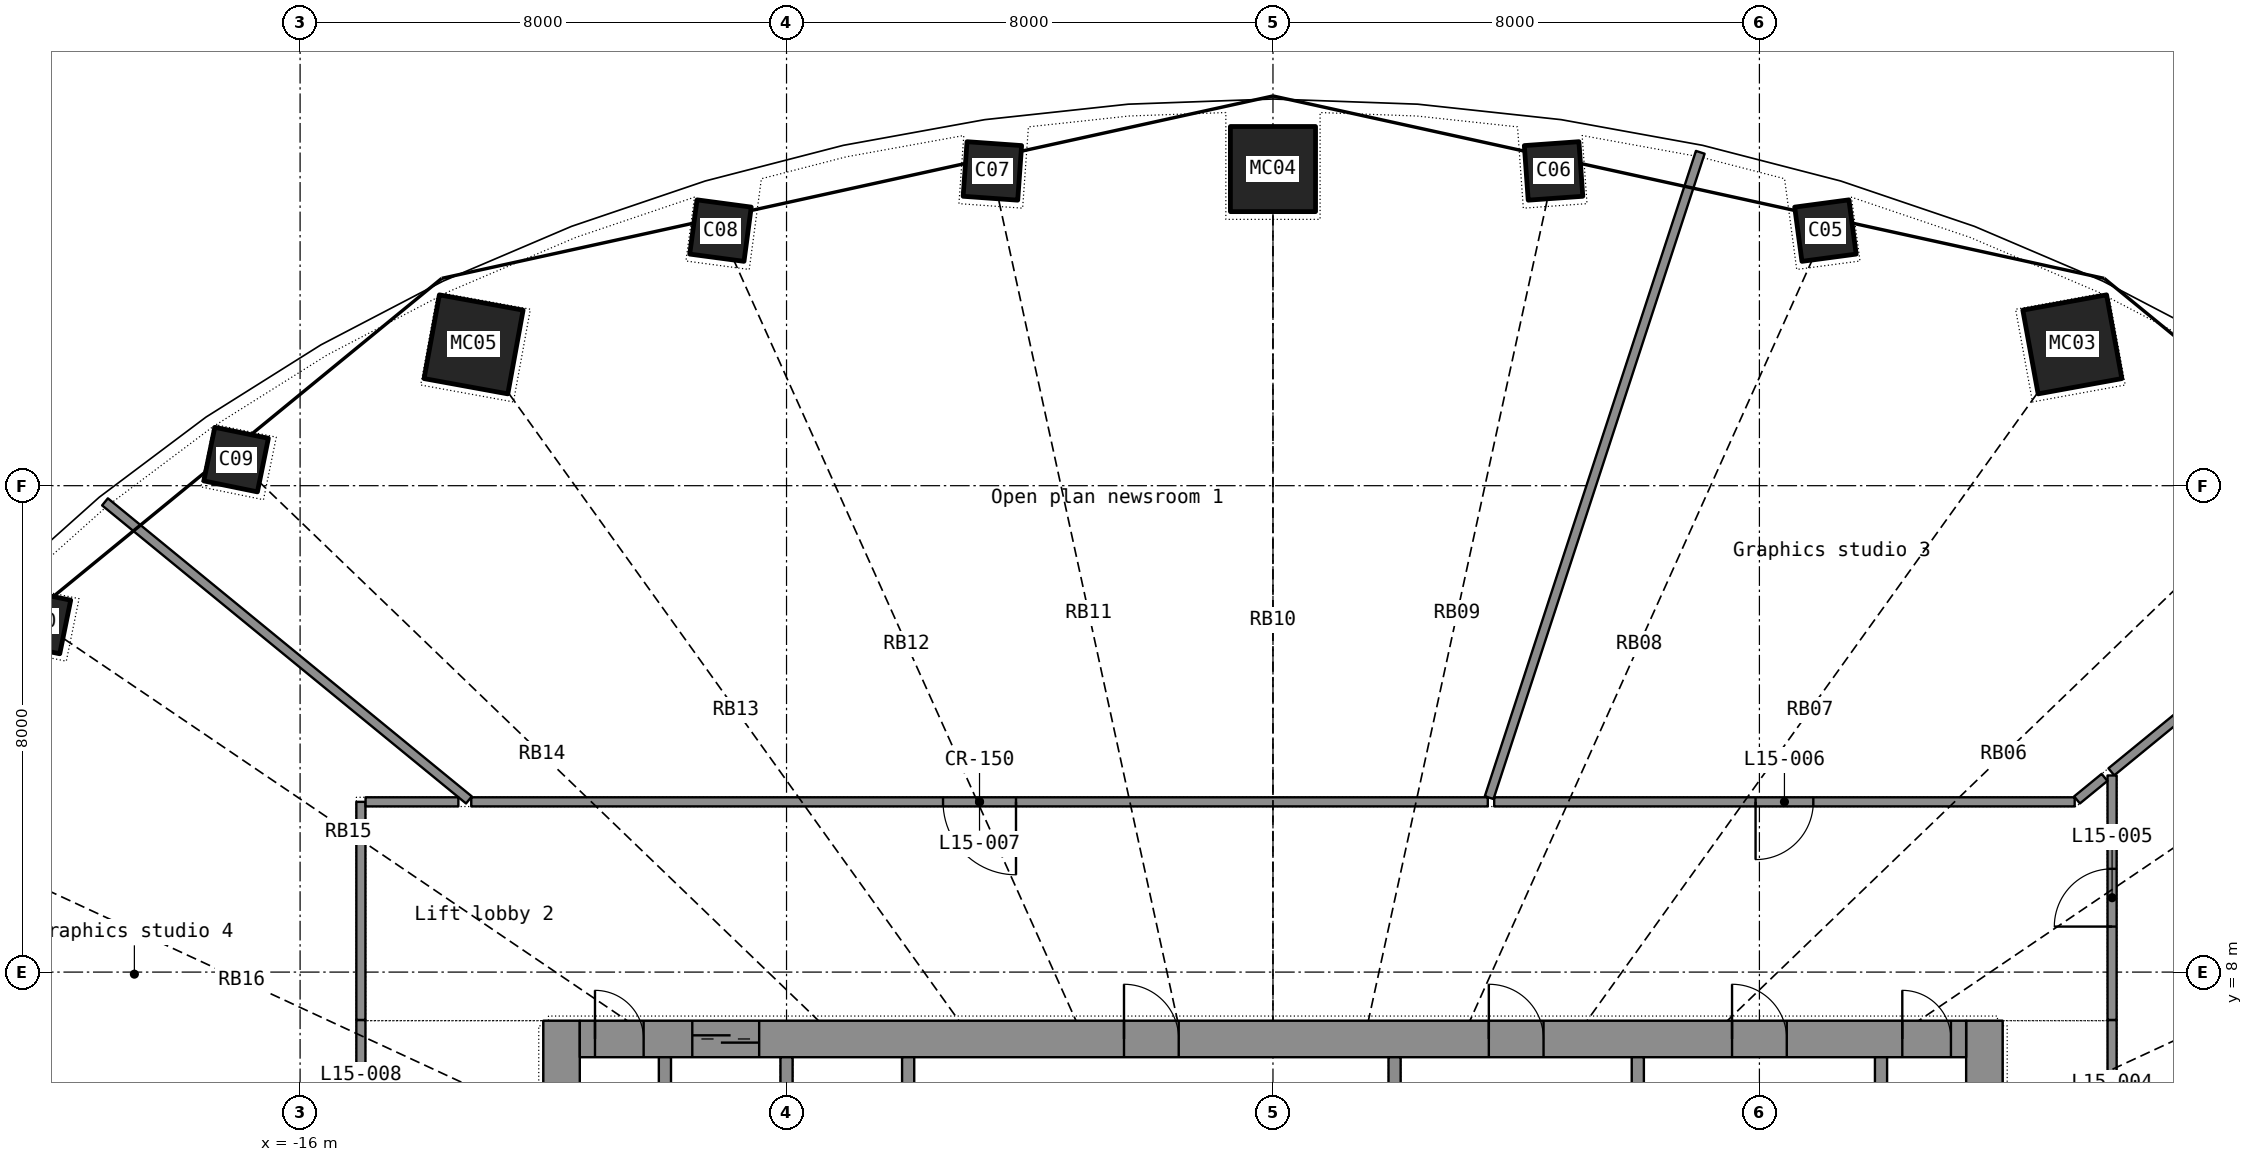
"""IFC4 building model, lengths in metres.
Left out: names, types, materials, properties, quantities, classifications, styles, units other than length and angle.
Written with IfcOpenShell. Run it as: python <this file> out.ifc"""

import sys

from ifc_helpers import new_model, si_unit, direction, frame, frame_2d, origin, origin_2d, place, context, subcontext, project, spatial, rectangle, hollow_rectangle, extrude, element, fill, save


model = new_model("IFC4")
c1 = context("Model", 3, precision=1e-05, world=origin(), true_north=direction((0.0, 1.0)))
c2 = subcontext(c1, "Body", "Model", "MODEL_VIEW")
j1 = project(units=[si_unit("LENGTHUNIT", "METRE"), si_unit("PLANEANGLEUNIT", "RADIAN")], contexts=[c1])
p1 = place(None, origin())
s1 = spatial("IfcSite", under=j1, at=p1, CompositionType="ELEMENT")
p2 = place(p1, origin())
s2 = spatial("IfcBuilding", under=s1, at=p2, CompositionType="ELEMENT")
p3 = place(p2, frame((0.0, 0.0, 66.7)))
s3 = spatial("IfcBuildingStorey", under=s2, at=p3, CompositionType="ELEMENT", Elevation=66.7)
p4 = place(p3, frame((13.146, 18.324, 0.0), z_axis=(-0.017280237, -0.024535299, 0.999549605), x_axis=(0.907657106, -0.419677884, 0.005390036)))
e1 = element("IfcColumn", 1, at=p4, inside=s3, PredefinedType="COLUMN", context=c2, shape_type="SweptSolid", body=[
    extrude(hollow_rectangle(XDim=1.4, YDim=1.4, WallThickness=0.04, at=origin_2d()), origin(), (0.0, 0.0, 1.0), 3.702),
])
for number, where, z_axis, x_axis in (
    (2, (9.086, 20.196, 0.0), (-0.012, -0.027, 1.0), (0.959, -0.282, 0.004)),
    (3, (4.615, 21.177, 0.0), (-0.006, -0.028, 1.0), (0.99, -0.14, 0.002)),
):
    element("IfcColumn", number, at=place(p3, frame(where, z_axis=z_axis, x_axis=x_axis)), inside=s3, PredefinedType="COLUMN", context=c2, shape_type="SweptSolid", body=[
        extrude(hollow_rectangle(XDim=0.9, YDim=0.9, WallThickness=0.025, at=origin_2d()), origin(), (0.0, 0.0, 1.0), 3.701),
    ])
p5 = place(p3, frame((0.0, 21.208, 0.0), z_axis=(0.0, -0.02836206, 0.999597716), x_axis=(1.0, 0.0, 0.0)))
e4 = element("IfcColumn", 4, at=p5, inside=s3, PredefinedType="COLUMN", context=c2, shape_type="SweptSolid", body=[
    extrude(hollow_rectangle(XDim=1.4, YDim=1.4, WallThickness=0.04, at=origin_2d()), origin(), (0.0, 0.0, 1.0), 3.701),
])
for number, where, z_axis, x_axis in (
    (5, (-4.615, 21.177, 0.0), (0.006, -0.028, 1.0), (0.99, 0.14, -0.002)),
    (6, (-9.086, 20.196, 0.0), (0.012, -0.027, 1.0), (0.959, 0.282, -0.004)),
):
    element("IfcColumn", number, at=place(p3, frame(where, z_axis=z_axis, x_axis=x_axis)), inside=s3, PredefinedType="COLUMN", context=c2, shape_type="SweptSolid", body=[
        extrude(hollow_rectangle(XDim=0.9, YDim=0.9, WallThickness=0.025, at=origin_2d()), origin(), (0.0, 0.0, 1.0), 3.701),
    ])
p6 = place(p3, frame((-13.146, 18.324, 0.0), z_axis=(0.017280237, -0.024535299, 0.999549605), x_axis=(0.907657106, 0.419677884, -0.005390036)))
e7 = element("IfcColumn", 7, at=p6, inside=s3, PredefinedType="COLUMN", context=c2, shape_type="SweptSolid", body=[
    extrude(hollow_rectangle(XDim=1.4, YDim=1.4, WallThickness=0.04, at=origin_2d()), origin(), (0.0, 0.0, 1.0), 3.702),
])
p7 = place(p3, frame((-17.052, 16.429, 0.0), z_axis=(0.022226156, -0.021698532, 0.999517469), x_axis=(0.82776399, 0.561041886, -0.006227231)))
e8 = element("IfcColumn", 8, at=p7, inside=s3, PredefinedType="COLUMN", context=c2, shape_type="SweptSolid", body=[
    extrude(hollow_rectangle(XDim=0.9, YDim=0.9, WallThickness=0.025, at=origin_2d()), origin(), (0.0, 0.0, 1.0), 3.702),
])
p8 = place(p3, frame((-20.303, 13.767, 0.0), z_axis=(0.026512179, -0.018202391, 0.999482755), x_axis=(0.719547914, 0.694412935, -0.006440138)))
e9 = element("IfcColumn", 9, at=p8, inside=s3, PredefinedType="COLUMN", context=c2, shape_type="SweptSolid", body=[
    extrude(hollow_rectangle(XDim=0.9, YDim=0.9, WallThickness=0.025, at=origin_2d()), origin(), (0.0, 0.0, 1.0), 3.702),
])
p9 = place(p3, frame((-11.7, -7.2, 0.0), z_axis=(0.0, 0.0, 1.0), x_axis=(0.0, 1.0, 0.0)))
e10 = element("IfcWall", 10, at=p9, inside=s3, PredefinedType="SHEAR", context=c2, shape_type="SweptSolid", body=[
    extrude(rectangle(XDim=14.4, YDim=0.6, at=frame_2d((7.2, 0.0))), origin(), (0.0, 0.0, 1.0), 3.3),
])
p10 = place(p9, frame((6.5, 0.0, 0.0)))
e11 = element("IfcOpeningElement", 11, at=p10, cuts=e10, PredefinedType="OPENING", context=c2, shape_type="SweptSolid", body=[
    extrude(rectangle(XDim=1.4, YDim=2.2, at=frame_2d((0.7, 1.1))), frame((0.0, 0.31, 0.0), z_axis=(0.0, -1.0, 0.0), x_axis=(1.0, 0.0, 0.0)), (0.0, 0.0, 1.0), 0.62),
])
p11 = place(p3, frame((11.7, -7.2, 0.0), z_axis=(0.0, 0.0, 1.0), x_axis=(0.0, 1.0, 0.0)))
e12 = element("IfcWall", 12, at=p11, inside=s3, PredefinedType="SHEAR", context=c2, shape_type="SweptSolid", body=[
    extrude(rectangle(XDim=14.4, YDim=0.6, at=frame_2d((7.2, 0.0))), origin(), (0.0, 0.0, 1.0), 3.3),
])
p12 = place(p11, frame((6.5, 0.0, 0.0)))
e13 = element("IfcOpeningElement", 13, at=p12, cuts=e12, PredefinedType="OPENING", context=c2, shape_type="SweptSolid", body=[
    extrude(rectangle(XDim=1.4, YDim=2.2, at=frame_2d((0.7, 1.1))), frame((0.0, 0.31, 0.0), z_axis=(0.0, -1.0, 0.0), x_axis=(1.0, 0.0, 0.0)), (0.0, 0.0, 1.0), 0.62),
])
p13 = place(p3, frame((-11.4, 6.9, 0.0), z_axis=(0.0, 0.0, 1.0), x_axis=(1.0, 0.0, 0.0)))
e14 = element("IfcWall", 14, at=p13, inside=s3, PredefinedType="SHEAR", context=c2, shape_type="SweptSolid", body=[
    extrude(rectangle(XDim=22.8, YDim=0.6, at=frame_2d((11.4, 0.0))), origin(), (0.0, 0.0, 1.0), 3.3),
])
p14 = place(p13, frame((1.85, 0.0, 0.0)))
e15 = element("IfcOpeningElement", 15, at=p14, cuts=e14, PredefinedType="OPENING", context=c2, shape_type="SweptSolid", body=[
    extrude(rectangle(XDim=1.1, YDim=2.2, at=frame_2d((0.55, 1.1))), frame((0.0, 0.31, 0.0), z_axis=(0.0, -1.0, 0.0), x_axis=(1.0, 0.0, 0.0)), (0.0, 0.0, 1.0), 0.62),
])
p15 = place(p13, frame((8.95, 0.0, 0.0)))
e16 = element("IfcOpeningElement", 16, at=p15, cuts=e14, PredefinedType="OPENING", context=c2, shape_type="SweptSolid", body=[
    extrude(rectangle(XDim=0.9, YDim=2.1, at=frame_2d((0.45, 1.05))), frame((0.0, 0.31, 0.0), z_axis=(0.0, -1.0, 0.0), x_axis=(1.0, 0.0, 0.0)), (0.0, 0.0, 1.0), 0.62),
])
p16 = place(p13, frame((14.95, 0.0, 0.0)))
e17 = element("IfcOpeningElement", 17, at=p16, cuts=e14, PredefinedType="OPENING", context=c2, shape_type="SweptSolid", body=[
    extrude(rectangle(XDim=0.9, YDim=2.1, at=frame_2d((0.45, 1.05))), frame((0.0, 0.31, 0.0), z_axis=(0.0, -1.0, 0.0), x_axis=(1.0, 0.0, 0.0)), (0.0, 0.0, 1.0), 0.62),
])
p17 = place(p13, frame((18.95, 0.0, 0.0)))
e18 = element("IfcOpeningElement", 18, at=p17, cuts=e14, PredefinedType="OPENING", context=c2, shape_type="SweptSolid", body=[
    extrude(rectangle(XDim=0.9, YDim=2.1, at=frame_2d((0.45, 1.05))), frame((0.0, 0.31, 0.0), z_axis=(0.0, -1.0, 0.0), x_axis=(1.0, 0.0, 0.0)), (0.0, 0.0, 1.0), 0.62),
])
p18 = place(p13, frame((0.25, 0.0, 0.0)))
e19 = element("IfcOpeningElement", 19, at=p18, cuts=e14, PredefinedType="OPENING", context=c2, shape_type="SweptSolid", body=[
    extrude(rectangle(XDim=0.8, YDim=2.05, at=frame_2d((0.4, 1.025))), frame((0.0, 0.31, 0.0), z_axis=(0.0, -1.0, 0.0), x_axis=(1.0, 0.0, 0.0)), (0.0, 0.0, 1.0), 0.62),
])
p19 = place(p13, frame((21.75, 0.0, 0.0)))
e20 = element("IfcOpeningElement", 20, at=p19, cuts=e14, PredefinedType="OPENING", context=c2, shape_type="SweptSolid", body=[
    extrude(rectangle(XDim=0.8, YDim=2.05, at=frame_2d((0.4, 1.025))), frame((0.0, 0.31, 0.0), z_axis=(0.0, -1.0, 0.0), x_axis=(1.0, 0.0, 0.0)), (0.0, 0.0, 1.0), 0.62),
])
for number, where, z_axis, x_axis in (
    (21, (-10.0, 3.9, 0.0), (0.0, 0.0, 1.0), (0.0, 1.0, 0.0)),
    (22, (-8.0, 3.9, 0.0), (0.0, 0.0, 1.0), (0.0, 1.0, 0.0)),
    (23, (-6.0, 3.9, 0.0), (0.0, 0.0, 1.0), (0.0, 1.0, 0.0)),
    (24, (10.0, 3.9, 0.0), (0.0, 0.0, 1.0), (0.0, 1.0, 0.0)),
):
    element("IfcWall", number, at=place(p3, frame(where, z_axis=z_axis, x_axis=x_axis)), inside=s3, PredefinedType="SHEAR", context=c2, shape_type="SweptSolid", body=[
        extrude(rectangle(XDim=2.7, YDim=0.2, at=frame_2d((1.35, 0.0))), origin(), (0.0, 0.0, 1.0), 3.3),
    ])
for number, where, z_axis, x_axis in (
    (25, (2.0, 3.9, 0.0), (0.0, 0.0, 1.0), (0.0, 1.0, 0.0)),
    (26, (6.0, 3.9, 0.0), (0.0, 0.0, 1.0), (0.0, 1.0, 0.0)),
):
    element("IfcWall", number, at=place(p3, frame(where, z_axis=z_axis, x_axis=x_axis)), inside=s3, PredefinedType="PARTITIONING", context=c2, shape_type="SweptSolid", body=[
        extrude(rectangle(XDim=2.7, YDim=0.2, at=frame_2d((1.35, 0.0))), origin(), (0.0, 0.0, 1.0), 3.3),
    ])
p20 = place(p3, frame((3.533, 10.8, 0.0), z_axis=(0.0, 0.0, 1.0), x_axis=(-1.0, 0.0, 0.0)))
e27 = element("IfcWall", 27, at=p20, inside=s3, PredefinedType="PARTITIONING", context=c2, shape_type="SweptSolid", body=[
    extrude(rectangle(XDim=16.718, YDim=0.15, at=frame_2d((8.359, 0.0))), origin(), (0.0, 0.0, 1.0), 2.4),
])
p21 = place(p20, frame((7.759, 0.0, 0.0)))
e28 = element("IfcOpeningElement", 28, at=p21, cuts=e27, PredefinedType="OPENING", context=c2, shape_type="SweptSolid", body=[
    extrude(rectangle(XDim=1.2, YDim=2.2, at=frame_2d((0.6, 1.1))), frame((0.0, 0.085, 0.0), z_axis=(0.0, -1.0, 0.0), x_axis=(1.0, 0.0, 0.0)), (0.0, 0.0, 1.0), 0.17),
])
p22 = place(p3, frame((7.028, 21.483, 0.0), z_axis=(0.0, 0.0, 1.0), x_axis=(-0.31091662, -0.950437192, 0.0)))
e29 = element("IfcWall", 29, at=p22, inside=s3, PredefinedType="PARTITIONING", context=c2, shape_type="SweptSolid", body=[
    extrude(rectangle(XDim=11.167, YDim=0.15, at=frame_2d((5.583, 0.0))), origin(), (0.0, 0.0, 1.0), 2.4),
])
p23 = place(p3, frame((13.185, 10.8, 0.0), z_axis=(0.0, 0.0, 1.0), x_axis=(-1.0, 0.0, 0.0)))
e30 = element("IfcWall", 30, at=p23, inside=s3, PredefinedType="PARTITIONING", context=c2, shape_type="SweptSolid", body=[
    extrude(rectangle(XDim=9.547, YDim=0.15, at=frame_2d((4.773, 0.0))), origin(), (0.0, 0.0, 1.0), 2.4),
])
p24 = place(p23, frame((4.298, 0.0, 0.0)))
e31 = element("IfcOpeningElement", 31, at=p24, cuts=e30, PredefinedType="OPENING", context=c2, shape_type="SweptSolid", body=[
    extrude(rectangle(XDim=0.95, YDim=2.15, at=frame_2d((0.475, 1.075))), frame((0.0, 0.085, 0.0), z_axis=(0.0, -1.0, 0.0), x_axis=(1.0, 0.0, 0.0)), (0.0, 0.0, 1.0), 0.17),
])
p25 = place(p3, frame((-19.208, 15.734, 0.0), z_axis=(0.0, 0.0, 1.0), x_axis=(0.773597247, -0.633677598, 0.0)))
e32 = element("IfcWall", 32, at=p25, inside=s3, PredefinedType="PARTITIONING", context=c2, shape_type="SweptSolid", body=[
    extrude(rectangle(XDim=7.737, YDim=0.15, at=frame_2d((3.868, 0.0))), origin(), (0.0, 0.0, 1.0), 2.4),
])
p26 = place(p3, frame((19.207, 15.733, 0.0), z_axis=(0.0, 0.0, 1.0), x_axis=(-0.773587592, -0.633689385, 0.0)))
e33 = element("IfcWall", 33, at=p26, inside=s3, PredefinedType="PARTITIONING", context=c2, shape_type="SweptSolid", body=[
    extrude(rectangle(XDim=7.005, YDim=0.15, at=frame_2d((3.502, 0.0))), origin(), (0.0, 0.0, 1.0), 2.4),
])
p27 = place(p3, frame((13.8, 3.124, 0.0), z_axis=(0.0, 0.0, 1.0), x_axis=(0.0, 1.0, 0.0)))
e34 = element("IfcWall", 34, at=p27, inside=s3, PredefinedType="PARTITIONING", context=c2, shape_type="SweptSolid", body=[
    extrude(rectangle(XDim=4.088, YDim=0.15, at=frame_2d((2.044, 0.0))), origin(), (0.0, 0.0, 1.0), 2.4),
])
p28 = place(p27, frame((1.569, 0.0, 0.0)))
e35 = element("IfcOpeningElement", 35, at=p28, cuts=e34, PredefinedType="OPENING", context=c2, shape_type="SweptSolid", body=[
    extrude(rectangle(XDim=0.95, YDim=2.15, at=frame_2d((0.475, 1.075))), frame((0.0, 0.085, 0.0), z_axis=(0.0, -1.0, 0.0), x_axis=(1.0, 0.0, 0.0)), (0.0, 0.0, 1.0), 0.17),
])
p29 = place(p3, frame((13.8, 7.213, 0.0), z_axis=(0.0, 0.0, 1.0), x_axis=(0.0, 1.0, 0.0)))
e36 = element("IfcWall", 36, at=p29, inside=s3, PredefinedType="PARTITIONING", context=c2, shape_type="SweptSolid", body=[
    extrude(rectangle(XDim=4.021, YDim=0.15, at=frame_2d((2.01, 0.0))), origin(), (0.0, 0.0, 1.0), 2.4),
])
p30 = place(p29, frame((1.535, 0.0, 0.0)))
e37 = element("IfcOpeningElement", 37, at=p30, cuts=e36, PredefinedType="OPENING", context=c2, shape_type="SweptSolid", body=[
    extrude(rectangle(XDim=0.95, YDim=2.15, at=frame_2d((0.475, 1.075))), frame((0.0, 0.085, 0.0), z_axis=(0.0, -1.0, 0.0), x_axis=(1.0, 0.0, 0.0)), (0.0, 0.0, 1.0), 0.17),
])
p31 = place(p3, frame((-15.0, 7.212, 0.0), z_axis=(0.0, 0.0, 1.0), x_axis=(0.0, -1.0, 0.0)))
e38 = element("IfcWall", 38, at=p31, inside=s3, PredefinedType="PARTITIONING", context=c2, shape_type="SweptSolid", body=[
    extrude(rectangle(XDim=3.824, YDim=0.15, at=frame_2d((1.912, 0.0))), origin(), (0.0, 0.0, 1.0), 2.4),
])
p32 = place(p31, frame((1.437, 0.0, 0.0)))
e39 = element("IfcOpeningElement", 39, at=p32, cuts=e38, PredefinedType="OPENING", context=c2, shape_type="SweptSolid", body=[
    extrude(rectangle(XDim=0.95, YDim=2.15, at=frame_2d((0.475, 1.075))), frame((0.0, 0.085, 0.0), z_axis=(0.0, -1.0, 0.0), x_axis=(1.0, 0.0, 0.0)), (0.0, 0.0, 1.0), 0.17),
])
p33 = place(p3, frame((-15.0, 10.8, 0.0), z_axis=(0.0, 0.0, 1.0), x_axis=(0.0, -1.0, 0.0)))
e40 = element("IfcWall", 40, at=p33, inside=s3, PredefinedType="PARTITIONING", context=c2, shape_type="SweptSolid", body=[
    extrude(rectangle(XDim=3.587, YDim=0.15, at=frame_2d((1.793, 0.0))), origin(), (0.0, 0.0, 1.0), 2.4),
])
p34 = place(p3, frame((-13.397, 10.8, 0.0), z_axis=(0.0, 0.0, 1.0), x_axis=(-1.0, 0.0, 0.0)))
e41 = element("IfcWall", 41, at=p34, inside=s3, PredefinedType="PARTITIONING", context=c2, shape_type="SweptSolid", body=[
    extrude(rectangle(XDim=1.526, YDim=0.15, at=frame_2d((0.763, 0.0))), origin(), (0.0, 0.0, 1.0), 2.4),
])
p35 = place(p3, frame((13.676, 11.202, 0.0), z_axis=(0.0, 0.0, 1.0), x_axis=(-0.773566552, -0.63371507, 0.0)))
e42 = element("IfcWall", 42, at=p35, inside=s3, PredefinedType="PARTITIONING", context=c2, shape_type="SweptSolid", body=[
    extrude(rectangle(XDim=0.585, YDim=0.15, at=frame_2d((0.292, 0.0))), origin(), (0.0, 0.0, 1.0), 2.4),
])
p36 = place(p14, origin())
e43 = element("IfcDoor", 43, at=p36, inside=s3, OperationType="DOUBLE_DOOR_SLIDING", PredefinedType="DOOR", context=c2, shape_type="SweptSolid", body=[
    extrude(rectangle(XDim=1.1, YDim=2.2, at=frame_2d((0.55, 1.1))), frame((0.0, 0.025, 0.0), z_axis=(0.0, -1.0, 0.0), x_axis=(1.0, 0.0, 0.0)), (0.0, 0.0, 1.0), 0.05),
])
fill(e15, e43)
p37 = place(p15, origin())
e44 = element("IfcDoor", 44, at=p37, inside=s3, OperationType="SINGLE_SWING_LEFT", PredefinedType="DOOR", context=c2, shape_type="SweptSolid", body=[
    extrude(rectangle(XDim=0.9, YDim=2.1, at=frame_2d((0.45, 1.05))), frame((0.0, 0.025, 0.0), z_axis=(0.0, -1.0, 0.0), x_axis=(1.0, 0.0, 0.0)), (0.0, 0.0, 1.0), 0.05),
])
fill(e16, e44)
p38 = place(p16, origin())
e45 = element("IfcDoor", 45, at=p38, inside=s3, OperationType="SINGLE_SWING_LEFT", PredefinedType="DOOR", context=c2, shape_type="SweptSolid", body=[
    extrude(rectangle(XDim=0.9, YDim=2.1, at=frame_2d((0.45, 1.05))), frame((0.0, 0.025, 0.0), z_axis=(0.0, -1.0, 0.0), x_axis=(1.0, 0.0, 0.0)), (0.0, 0.0, 1.0), 0.05),
])
fill(e17, e45)
p39 = place(p17, origin())
e46 = element("IfcDoor", 46, at=p39, inside=s3, OperationType="SINGLE_SWING_LEFT", PredefinedType="DOOR", context=c2, shape_type="SweptSolid", body=[
    extrude(rectangle(XDim=0.9, YDim=2.1, at=frame_2d((0.45, 1.05))), frame((0.0, 0.025, 0.0), z_axis=(0.0, -1.0, 0.0), x_axis=(1.0, 0.0, 0.0)), (0.0, 0.0, 1.0), 0.05),
])
fill(e18, e46)
p40 = place(p18, origin())
e47 = element("IfcDoor", 47, at=p40, inside=s3, OperationType="SINGLE_SWING_LEFT", PredefinedType="DOOR", context=c2, shape_type="SweptSolid", body=[
    extrude(rectangle(XDim=0.8, YDim=2.05, at=frame_2d((0.4, 1.025))), frame((0.0, 0.025, 0.0), z_axis=(0.0, -1.0, 0.0), x_axis=(1.0, 0.0, 0.0)), (0.0, 0.0, 1.0), 0.05),
])
fill(e19, e47)
p41 = place(p19, origin())
e48 = element("IfcDoor", 48, at=p41, inside=s3, OperationType="SINGLE_SWING_LEFT", PredefinedType="DOOR", context=c2, shape_type="SweptSolid", body=[
    extrude(rectangle(XDim=0.8, YDim=2.05, at=frame_2d((0.4, 1.025))), frame((0.0, 0.025, 0.0), z_axis=(0.0, -1.0, 0.0), x_axis=(1.0, 0.0, 0.0)), (0.0, 0.0, 1.0), 0.05),
])
fill(e20, e48)
p42 = place(p30, origin())
e49 = element("IfcDoor", 49, at=p42, inside=s3, OperationType="SINGLE_SWING_LEFT", PredefinedType="DOOR", context=c2, shape_type="SweptSolid", body=[
    extrude(rectangle(XDim=0.95, YDim=2.15, at=frame_2d((0.475, 1.075))), frame((0.0, 0.025, 0.0), z_axis=(0.0, -1.0, 0.0), x_axis=(1.0, 0.0, 0.0)), (0.0, 0.0, 1.0), 0.05),
])
fill(e37, e49)
p43 = place(p24, origin())
e50 = element("IfcDoor", 50, at=p43, inside=s3, OperationType="SINGLE_SWING_RIGHT", PredefinedType="DOOR", context=c2, shape_type="SweptSolid", body=[
    extrude(rectangle(XDim=0.95, YDim=2.15, at=frame_2d((0.475, 1.075))), frame((0.0, 0.025, 0.0), z_axis=(0.0, -1.0, 0.0), x_axis=(1.0, 0.0, 0.0)), (0.0, 0.0, 1.0), 0.05),
])
fill(e31, e50)
p44 = place(p21, origin())
e51 = element("IfcDoor", 51, at=p44, inside=s3, OperationType="DOUBLE_DOOR_SINGLE_SWING", PredefinedType="DOOR", context=c2, shape_type="SweptSolid", body=[
    extrude(rectangle(XDim=1.2, YDim=2.2, at=frame_2d((0.6, 1.1))), frame((0.0, 0.025, 0.0), z_axis=(0.0, -1.0, 0.0), x_axis=(1.0, 0.0, 0.0)), (0.0, 0.0, 1.0), 0.05),
])
fill(e28, e51)
save(model, sys.argv[1])
